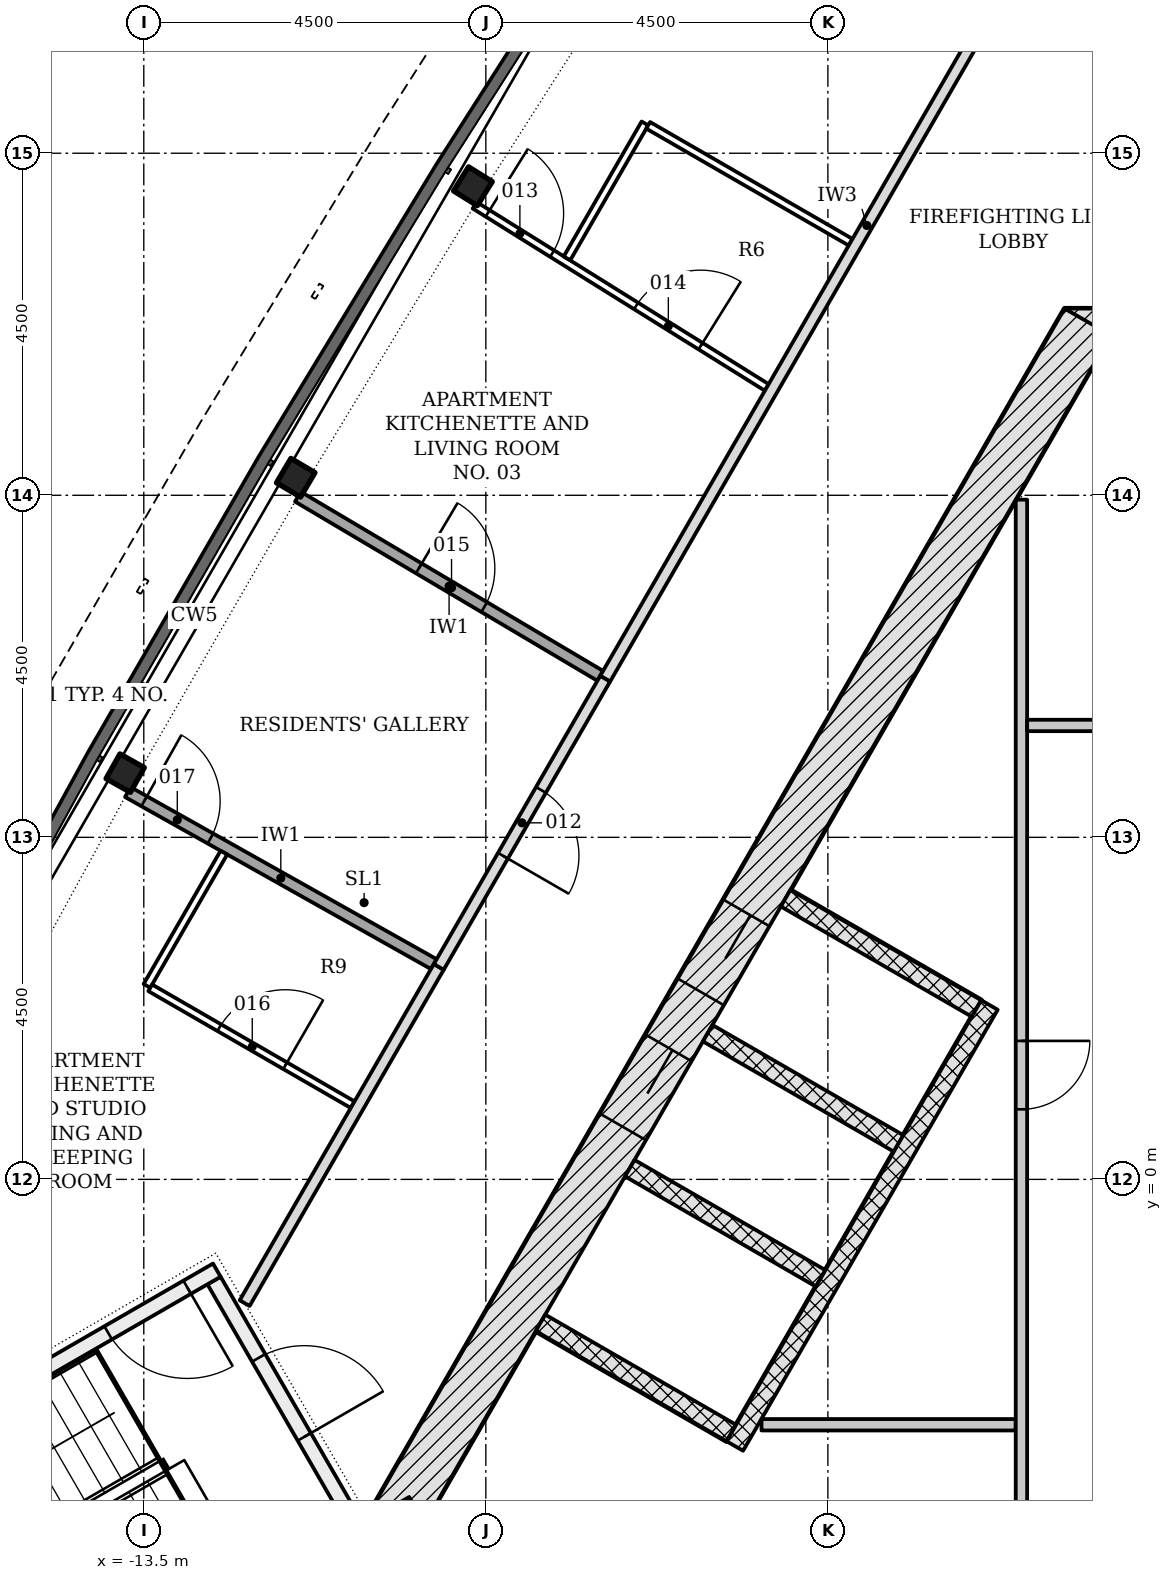
"""IFC4 building model, lengths in metres.
Left out: names, types, materials, properties, quantities, classifications, styles, units other than length and angle.
Written with IfcOpenShell. Run it as: python <this file> out.ifc"""

import sys

from ifc_helpers import new_model, si_unit, direction, frame, frame_2d, origin, origin_2d, place, context, subcontext, project, spatial, polyline, rectangle, i_section, outline, extrude, element, fill, save


model = new_model("IFC4")
c1 = context("Model", 3, precision=1e-05, world=origin(), true_north=direction((0.0, 1.0)))
c2 = subcontext(c1, "Body", "Model", "MODEL_VIEW")
j1 = project(units=[si_unit("LENGTHUNIT", "METRE"), si_unit("PLANEANGLEUNIT", "RADIAN")], contexts=[c1])
p1 = place(None, origin())
s1 = spatial("IfcSite", under=j1, at=p1, CompositionType="ELEMENT")
p2 = place(p1, origin())
s2 = spatial("IfcBuilding", under=s1, at=p2, CompositionType="ELEMENT")
p3 = place(p2, frame((0.0, 0.0, 232.8)))
s3 = spatial("IfcBuildingStorey", under=s2, at=p3, CompositionType="ELEMENT", Elevation=232.8)
p4 = place(p3, frame((1.386, 11.106, -0.2), z_axis=(0.0, 0.0, 1.0), x_axis=(-1.0, 0.0, 0.0)))
e1 = element("IfcWall", 1, at=p4, inside=s3, PredefinedType="SHEAR", context=c2, shape_type="SweptSolid", body=[
    extrude(rectangle(XDim=2.771, YDim=0.7, at=frame_2d((1.386, 0.0))), origin(), (0.0, 0.0, 1.0), 3.6),
])
p5 = place(p3, frame((-1.083, 11.281, -0.2), z_axis=(0.0, 0.0, 1.0), x_axis=(-0.500001446645, -0.866024568562, 0.0)))
e2 = element("IfcWall", 2, at=p5, inside=s3, PredefinedType="SHEAR", context=c2, shape_type="SweptSolid", body=[
    extrude(rectangle(XDim=18.458, YDim=0.7, at=frame_2d((9.229, 0.0))), origin(), (0.0, 0.0, 1.0), 3.6),
])
p6 = place(p5, frame((8.979, 0.0, 0.2)))
e3 = element("IfcOpeningElement", 3, at=p6, cuts=e2, PredefinedType="OPENING", context=c2, shape_type="SweptSolid", body=[
    extrude(rectangle(XDim=1.2, YDim=2.1, at=frame_2d((0.6, 1.05))), frame((0.0, 0.36, 0.0), z_axis=(0.0, -1.0, 0.0), x_axis=(1.0, 0.0, 0.0)), (0.0, 0.0, 1.0), 0.72),
])
p7 = place(p5, frame((11.029, 0.0, 0.2)))
e4 = element("IfcOpeningElement", 4, at=p7, cuts=e2, PredefinedType="OPENING", context=c2, shape_type="SweptSolid", body=[
    extrude(rectangle(XDim=1.2, YDim=2.1, at=frame_2d((0.6, 1.05))), frame((0.0, 0.36, 0.0), z_axis=(0.0, -1.0, 0.0), x_axis=(1.0, 0.0, 0.0)), (0.0, 0.0, 1.0), 0.72),
])
p8 = place(p3, frame((-10.311, -4.353, -0.2), z_axis=(0.0, 0.0, 1.0), x_axis=(0.500042739161, -0.866000726912, 0.0)))
e5 = element("IfcWall", 5, at=p8, inside=s3, PredefinedType="SHEAR", context=c2, shape_type="SweptSolid", body=[
    extrude(rectangle(XDim=2.771, YDim=0.7, at=frame_2d((1.386, 0.0))), origin(), (0.0, 0.0, 1.0), 3.6),
])
for number, where, z_axis, x_axis in (
    (6, (-9.17, 13.065, -0.2), (0.0, 0.0, 1.0), (-0.529, -0.849, 0.0)),
    (7, (-11.501, 9.231, -0.2), (0.0, 0.0, 1.0), (-0.51, -0.86, 0.0)),
    (8, (-13.745, 5.345, -0.2), (0.0, 0.0, 1.0), (-0.49, -0.872, 0.0)),
):
    element("IfcColumn", number, at=place(p3, frame(where, z_axis=z_axis, x_axis=x_axis)), inside=s3, PredefinedType="COLUMN", context=c2, shape_type="SweptSolid", body=[
        extrude(i_section(OverallWidth=0.373, OverallDepth=0.368, WebThickness=0.015, FlangeThickness=0.024, FilletRadius=0.015, at=origin_2d()), origin(), (0.0, 0.0, 1.0), 3.6),
    ])
p9 = place(p3, origin())
e9 = element("IfcWall", 9, at=p9, inside=s3, PredefinedType="NOTDEFINED", context=c2, shape_type="SweptSolid", body=[
    extrude(outline(polyline([(-18.457, -2.328), (-19.842, -5.13), (-20.323, -6.478), (-20.504, -7.898), (-20.375, -9.323), (-19.942, -10.687), (-19.227, -11.927), (-18.261, -12.983), (-17.092, -13.808), (-15.772, -14.361), (-14.364, -14.619), (-11.244, -14.82), (-11.225, -14.521), (-14.327, -14.32), (-15.686, -14.072), (-16.945, -13.544), (-18.062, -12.757), (-18.983, -11.748), (-19.666, -10.566), (-20.079, -9.264), (-20.202, -7.903), (-20.03, -6.548), (-19.565, -5.248), (-18.188, -2.46), (-18.457, -2.328)])), origin(), (0.0, 0.0, 1.0), 3.3),
])
for number, where, z_axis, x_axis in (
    (10, (-5.056, 3.699, -0.2), (0.0, 0.0, 1.0), (0.866, -0.5, 0.0)),
    (11, (-6.081, 1.923, -0.2), (0.0, 0.0, 1.0), (0.866, -0.5, 0.0)),
    (12, (-7.106, 0.148, -0.2), (0.0, 0.0, 1.0), (0.866, -0.5, 0.0)),
    (13, (-8.281, -1.887, -0.2), (0.0, 0.0, 1.0), (0.866, -0.5, 0.0)),
):
    element("IfcWall", number, at=place(p3, frame(where, z_axis=z_axis, x_axis=x_axis)), inside=s3, PredefinedType="PARTITIONING", context=c2, shape_type="SweptSolid", body=[
        extrude(rectangle(XDim=2.9, YDim=0.25, at=frame_2d((1.45, 0.0))), origin(), (0.0, 0.0, 1.0), 3.6),
    ])
p10 = place(p3, frame((-2.374, 2.294, 0.0), z_axis=(0.0, 0.0, 1.0), x_axis=(-0.500003174267, -0.866023571113, 0.0)))
e14 = element("IfcWall", 14, at=p10, inside=s3, PredefinedType="PARTITIONING", context=c2, shape_type="SweptSolid", body=[
    extrude(rectangle(XDim=6.7, YDim=0.25, at=frame_2d((3.35, 0.0))), origin(), (0.0, 0.0, 1.0), 3.4),
])
p11 = place(p3, frame((-5.373, -3.228, 0.0), z_axis=(0.0, 0.0, 1.0), x_axis=(1.0, 0.0, 0.0)))
e15 = element("IfcWall", 15, at=p11, inside=s3, PredefinedType="PARTITIONING", context=c2, shape_type="SweptSolid", body=[
    extrude(rectangle(XDim=3.344, YDim=0.15, at=frame_2d((1.672, 0.0))), origin(), (0.0, 0.0, 1.0), 3.4),
])
p12 = place(p3, frame((-1.954, 8.942, 0.0), z_axis=(0.0, 0.0, 1.0), x_axis=(0.0, -1.0, 0.0)))
e16 = element("IfcWall", 16, at=p12, inside=s3, PredefinedType="PARTITIONING", context=c2, shape_type="SweptSolid", body=[
    extrude(rectangle(XDim=15.171, YDim=0.15, at=frame_2d((7.585, 0.0))), origin(), (0.0, 0.0, 1.0), 3.4),
])
p13 = place(p12, frame((7.121, 0.0, 0.0)))
e17 = element("IfcOpeningElement", 17, at=p13, cuts=e16, PredefinedType="OPENING", context=c2, shape_type="SweptSolid", body=[
    extrude(rectangle(XDim=0.9, YDim=2.1, at=frame_2d((0.45, 1.05))), frame((0.0, 0.085, 0.0), z_axis=(0.0, -1.0, 0.0), x_axis=(1.0, 0.0, 0.0)), (0.0, 0.0, 1.0), 0.17),
])
p14 = place(p3, frame((-1.879, 5.972, 0.0), z_axis=(0.0, 0.0, 1.0), x_axis=(1.0, 0.0, 0.0)))
e18 = element("IfcWall", 18, at=p14, inside=s3, PredefinedType="PARTITIONING", context=c2, shape_type="SweptSolid", body=[
    extrude(rectangle(XDim=1.375, YDim=0.15, at=frame_2d((0.688, 0.0))), origin(), (0.0, 0.0, 1.0), 3.4),
])
p15 = place(p3, frame((-12.576, -1.331, -0.2), z_axis=(0.0, 0.0, 1.0), x_axis=(0.499970499736, -0.8660424351, 0.0)))
e19 = element("IfcWall", 19, at=p15, inside=s3, PredefinedType="SHEAR", context=c2, shape_type="SweptSolid", body=[
    extrude(rectangle(XDim=3.55, YDim=0.2, at=frame_2d((1.775, 0.0))), origin(), (0.0, 0.0, 1.0), 3.6),
])
p16 = place(p15, frame((1.175, 0.0, 0.2)))
e20 = element("IfcOpeningElement", 20, at=p16, cuts=e19, PredefinedType="OPENING", context=c2, shape_type="SweptSolid", body=[
    extrude(rectangle(XDim=1.2, YDim=2.1, at=frame_2d((0.6, 1.05))), frame((0.0, 0.11, 0.0), z_axis=(0.0, -1.0, 0.0), x_axis=(1.0, 0.0, 0.0)), (0.0, 0.0, 1.0), 0.22),
])
p17 = place(p3, frame((-12.539, -1.194, -0.2), z_axis=(0.0, 0.0, 1.0), x_axis=(-0.866045472092, -0.499965239061, 0.0)))
e21 = element("IfcWall", 21, at=p17, inside=s3, PredefinedType="SHEAR", context=c2, shape_type="SweptSolid", body=[
    extrude(rectangle(XDim=5.6, YDim=0.2, at=frame_2d((2.8, 0.0))), origin(), (0.0, 0.0, 1.0), 3.6),
])
p18 = place(p17, frame((0.45, 0.0, 0.2)))
e22 = element("IfcOpeningElement", 22, at=p18, cuts=e21, PredefinedType="OPENING", context=c2, shape_type="SweptSolid", body=[
    extrude(rectangle(XDim=1.2, YDim=2.1, at=frame_2d((0.6, 1.05))), frame((0.0, 0.11, 0.0), z_axis=(0.0, -1.0, 0.0), x_axis=(1.0, 0.0, 0.0)), (0.0, 0.0, 1.0), 0.22),
])
p19 = place(p3, frame((-0.545, 18.513, 0.0), z_axis=(0.0, 0.0, 1.0), x_axis=(-0.499998165157, -0.866026463129, 0.0)))
e23 = element("IfcWall", 23, at=p19, inside=s3, PredefinedType="PARTITIONING", context=c2, shape_type="SweptSolid", body=[
    extrude(rectangle(XDim=13.771, YDim=0.15, at=frame_2d((6.886, 0.0))), origin(), (0.0, 0.0, 1.0), 2.852),
])
p20 = place(p3, frame((-9.619, 2.795, 0.0), z_axis=(0.0, 0.0, 1.0), x_axis=(-0.499963809755, -0.866046297224, 0.0)))
e24 = element("IfcWall", 24, at=p20, inside=s3, PredefinedType="PARTITIONING", context=c2, shape_type="SweptSolid", body=[
    extrude(rectangle(XDim=5.108, YDim=0.15, at=frame_2d((2.554, 0.0))), origin(), (0.0, 0.0, 1.0), 2.852),
])
p21 = place(p3, frame((-11.472, 8.981, 0.0), z_axis=(0.0, 0.0, 1.0), x_axis=(0.860336137803, -0.509727113257, 0.0)))
e25 = element("IfcWall", 25, at=p21, inside=s3, PredefinedType="PARTITIONING", context=c2, shape_type="SweptSolid", body=[
    extrude(rectangle(XDim=4.623, YDim=0.15, at=frame_2d((2.312, 0.0))), origin(), (0.0, 0.0, 1.0), 3.4),
])
p22 = place(p21, frame((1.849, 0.0, 0.0)))
e26 = element("IfcOpeningElement", 26, at=p22, cuts=e25, PredefinedType="OPENING", context=c2, shape_type="SweptSolid", body=[
    extrude(rectangle(XDim=1.0, YDim=2.1, at=frame_2d((0.5, 1.05))), frame((0.0, 0.085, 0.0), z_axis=(0.0, -1.0, 0.0), x_axis=(1.0, 0.0, 0.0)), (0.0, 0.0, 1.0), 0.17),
])
p23 = place(p3, frame((-13.71, 5.096, 0.0), z_axis=(0.0, 0.0, 1.0), x_axis=(0.871644704197, -0.490138255644, 0.0)))
e27 = element("IfcWall", 27, at=p23, inside=s3, PredefinedType="PARTITIONING", context=c2, shape_type="SweptSolid", body=[
    extrude(rectangle(XDim=4.618, YDim=0.15, at=frame_2d((2.309, 0.0))), origin(), (0.0, 0.0, 1.0), 3.4),
])
p24 = place(p23, frame((0.247, 0.0, 0.0)))
e28 = element("IfcOpeningElement", 28, at=p24, cuts=e27, PredefinedType="OPENING", context=c2, shape_type="SweptSolid", body=[
    extrude(rectangle(XDim=1.0, YDim=2.1, at=frame_2d((0.5, 1.05))), frame((0.0, 0.085, 0.0), z_axis=(0.0, -1.0, 0.0), x_axis=(1.0, 0.0, 0.0)), (0.0, 0.0, 1.0), 0.17),
])
p25 = place(p3, frame((-7.43, 6.586, 0.0), z_axis=(0.0, 0.0, 1.0), x_axis=(-0.500037854553, -0.866003547345, 0.0)))
e29 = element("IfcWall", 29, at=p25, inside=s3, PredefinedType="PARTITIONING", context=c2, shape_type="SweptSolid", body=[
    extrude(rectangle(XDim=4.378, YDim=0.15, at=frame_2d((2.189, 0.0))), origin(), (0.0, 0.0, 1.0), 2.852),
])
p26 = place(p25, frame((1.689, 0.0, 0.0)))
e30 = element("IfcOpeningElement", 30, at=p26, cuts=e29, PredefinedType="OPENING", context=c2, shape_type="SweptSolid", body=[
    extrude(rectangle(XDim=1.0, YDim=2.1, at=frame_2d((0.5, 1.05))), frame((0.0, 0.085, 0.0), z_axis=(0.0, -1.0, 0.0), x_axis=(1.0, 0.0, 0.0)), (0.0, 0.0, 1.0), 0.17),
])
p27 = place(p3, frame((-9.146, 12.815, 0.0), z_axis=(0.0, 0.0, 1.0), x_axis=(0.848537029676, -0.52913600262, 0.0)))
e31 = element("IfcWall", 31, at=p27, inside=s3, PredefinedType="PARTITIONING", context=c2, shape_type="SweptSolid", body=[
    extrude(rectangle(XDim=4.528, YDim=0.1, at=frame_2d((2.264, 0.0))), origin(), (0.0, 0.0, 1.0), 3.4),
])
p28 = place(p27, frame((0.201, 0.0, 0.0)))
e32 = element("IfcOpeningElement", 32, at=p28, cuts=e31, PredefinedType="OPENING", context=c2, shape_type="SweptSolid", body=[
    extrude(rectangle(XDim=1.0, YDim=2.1, at=frame_2d((0.5, 1.05))), frame((0.0, 0.06, 0.0), z_axis=(0.0, -1.0, 0.0), x_axis=(1.0, 0.0, 0.0)), (0.0, 0.0, 1.0), 0.12),
])
p29 = place(p27, frame((2.502, 0.0, 0.0)))
e33 = element("IfcOpeningElement", 33, at=p29, cuts=e31, PredefinedType="OPENING", context=c2, shape_type="SweptSolid", body=[
    extrude(rectangle(XDim=1.0, YDim=2.1, at=frame_2d((0.5, 1.05))), frame((0.0, 0.06, 0.0), z_axis=(0.0, -1.0, 0.0), x_axis=(1.0, 0.0, 0.0)), (0.0, 0.0, 1.0), 0.12),
])
p30 = place(p3, frame((-7.932, 12.117, 0.0), z_axis=(0.0, 0.0, 1.0), x_axis=(0.499956128963, 0.866050731258, 0.0)))
e34 = element("IfcWall", 34, at=p30, inside=s3, PredefinedType="PARTITIONING", context=c2, shape_type="SweptSolid", body=[
    extrude(rectangle(XDim=2.05, YDim=0.1, at=frame_2d((1.025, 0.0))), origin(), (0.0, 0.0, 1.0), 2.852),
])
p31 = place(p3, frame((-6.864, 13.867, 0.0), z_axis=(0.0, 0.0, 1.0), x_axis=(0.866016353143, -0.500015675843, 0.0)))
e35 = element("IfcWall", 35, at=p31, inside=s3, PredefinedType="PARTITIONING", context=c2, shape_type="SweptSolid", body=[
    extrude(rectangle(XDim=3.075, YDim=0.1, at=frame_2d((1.538, 0.0))), origin(), (0.0, 0.0, 1.0), 3.4),
])
p32 = place(p3, frame((-12.446, 4.299, 0.0), z_axis=(0.0, 0.0, 1.0), x_axis=(-0.499938124251, -0.866061124818, 0.0)))
e36 = element("IfcWall", 36, at=p32, inside=s3, PredefinedType="PARTITIONING", context=c2, shape_type="SweptSolid", body=[
    extrude(rectangle(XDim=2.025, YDim=0.1, at=frame_2d((1.013, 0.0))), origin(), (0.0, 0.0, 1.0), 3.4),
])
p33 = place(p3, frame((-13.415, 2.52, 0.0), z_axis=(0.0, 0.0, 1.0), x_axis=(0.865996501658, -0.50005005661, 0.0)))
e37 = element("IfcWall", 37, at=p33, inside=s3, PredefinedType="PARTITIONING", context=c2, shape_type="SweptSolid", body=[
    extrude(rectangle(XDim=3.075, YDim=0.1, at=frame_2d((1.538, 0.0))), origin(), (0.0, 0.0, 1.0), 3.4),
])
p34 = place(p33, frame((1.05, 0.0, 0.0)))
e38 = element("IfcOpeningElement", 38, at=p34, cuts=e37, PredefinedType="OPENING", context=c2, shape_type="SweptSolid", body=[
    extrude(rectangle(XDim=1.0, YDim=2.1, at=frame_2d((0.5, 1.05))), frame((0.0, 0.06, 0.0), z_axis=(0.0, -1.0, 0.0), x_axis=(1.0, 0.0, 0.0)), (0.0, 0.0, 1.0), 0.12),
])
p35 = place(p6, origin())
e39 = element("IfcDoor", 39, at=p35, inside=s3, OperationType="DOUBLE_DOOR_SLIDING", PredefinedType="DOOR", context=c2, shape_type="SweptSolid", body=[
    extrude(rectangle(XDim=1.2, YDim=2.1, at=frame_2d((0.6, 1.05))), frame((0.0, 0.025, 0.0), z_axis=(0.0, -1.0, 0.0), x_axis=(1.0, 0.0, 0.0)), (0.0, 0.0, 1.0), 0.05),
])
fill(e3, e39)
p36 = place(p7, origin())
e40 = element("IfcDoor", 40, at=p36, inside=s3, OperationType="DOUBLE_DOOR_SLIDING", PredefinedType="DOOR", context=c2, shape_type="SweptSolid", body=[
    extrude(rectangle(XDim=1.2, YDim=2.1, at=frame_2d((0.6, 1.05))), frame((0.0, 0.025, 0.0), z_axis=(0.0, -1.0, 0.0), x_axis=(1.0, 0.0, 0.0)), (0.0, 0.0, 1.0), 0.05),
])
fill(e4, e40)
p37 = place(p13, origin())
e41 = element("IfcDoor", 41, at=p37, inside=s3, OperationType="SINGLE_SWING_LEFT", PredefinedType="DOOR", context=c2, shape_type="SweptSolid", body=[
    extrude(rectangle(XDim=0.9, YDim=2.1, at=frame_2d((0.45, 1.05))), frame((0.0, 0.025, 0.0), z_axis=(0.0, -1.0, 0.0), x_axis=(1.0, 0.0, 0.0)), (0.0, 0.0, 1.0), 0.05),
])
fill(e17, e41)
p38 = place(p16, origin())
e42 = element("IfcDoor", 42, at=p38, inside=s3, OperationType="SINGLE_SWING_RIGHT", PredefinedType="DOOR", context=c2, shape_type="SweptSolid", body=[
    extrude(rectangle(XDim=1.2, YDim=2.1, at=frame_2d((0.6, 1.05))), frame((0.0, 0.025, 0.0), z_axis=(0.0, -1.0, 0.0), x_axis=(1.0, 0.0, 0.0)), (0.0, 0.0, 1.0), 0.05),
])
fill(e20, e42)
p39 = place(p18, origin())
e43 = element("IfcDoor", 43, at=p39, inside=s3, OperationType="SINGLE_SWING_LEFT", PredefinedType="DOOR", context=c2, shape_type="SweptSolid", body=[
    extrude(rectangle(XDim=1.2, YDim=2.1, at=frame_2d((0.6, 1.05))), frame((0.0, 0.025, 0.0), z_axis=(0.0, -1.0, 0.0), x_axis=(1.0, 0.0, 0.0)), (0.0, 0.0, 1.0), 0.05),
])
fill(e22, e43)
p40 = place(p26, origin())
e44 = element("IfcDoor", 44, at=p40, inside=s3, OperationType="SINGLE_SWING_RIGHT", PredefinedType="DOOR", context=c2, shape_type="SweptSolid", body=[
    extrude(rectangle(XDim=1.0, YDim=2.1, at=frame_2d((0.5, 1.05))), frame((0.0, 0.025, 0.0), z_axis=(0.0, -1.0, 0.0), x_axis=(1.0, 0.0, 0.0)), (0.0, 0.0, 1.0), 0.05),
])
fill(e30, e44)
p41 = place(p28, origin())
e45 = element("IfcDoor", 45, at=p41, inside=s3, OperationType="SINGLE_SWING_LEFT", PredefinedType="DOOR", context=c2, shape_type="SweptSolid", body=[
    extrude(rectangle(XDim=1.0, YDim=2.1, at=frame_2d((0.5, 1.05))), frame((0.0, 0.025, 0.0), z_axis=(0.0, -1.0, 0.0), x_axis=(1.0, 0.0, 0.0)), (0.0, 0.0, 1.0), 0.05),
])
fill(e32, e45)
p42 = place(p29, origin())
e46 = element("IfcDoor", 46, at=p42, inside=s3, OperationType="SINGLE_SWING_RIGHT", PredefinedType="DOOR", context=c2, shape_type="SweptSolid", body=[
    extrude(rectangle(XDim=1.0, YDim=2.1, at=frame_2d((0.5, 1.05))), frame((0.0, 0.025, 0.0), z_axis=(0.0, -1.0, 0.0), x_axis=(1.0, 0.0, 0.0)), (0.0, 0.0, 1.0), 0.05),
])
fill(e33, e46)
p43 = place(p22, origin())
e47 = element("IfcDoor", 47, at=p43, inside=s3, OperationType="SINGLE_SWING_LEFT", PredefinedType="DOOR", context=c2, shape_type="SweptSolid", body=[
    extrude(rectangle(XDim=1.0, YDim=2.1, at=frame_2d((0.5, 1.05))), frame((0.0, 0.025, 0.0), z_axis=(0.0, -1.0, 0.0), x_axis=(1.0, 0.0, 0.0)), (0.0, 0.0, 1.0), 0.05),
])
fill(e26, e47)
p44 = place(p34, origin())
e48 = element("IfcDoor", 48, at=p44, inside=s3, OperationType="SINGLE_SWING_RIGHT", PredefinedType="DOOR", context=c2, shape_type="SweptSolid", body=[
    extrude(rectangle(XDim=1.0, YDim=2.1, at=frame_2d((0.5, 1.05))), frame((0.0, 0.025, 0.0), z_axis=(0.0, -1.0, 0.0), x_axis=(1.0, 0.0, 0.0)), (0.0, 0.0, 1.0), 0.05),
])
fill(e38, e48)
p45 = place(p24, origin())
e49 = element("IfcDoor", 49, at=p45, inside=s3, OperationType="SINGLE_SWING_LEFT", PredefinedType="DOOR", context=c2, shape_type="SweptSolid", body=[
    extrude(rectangle(XDim=1.0, YDim=2.1, at=frame_2d((0.5, 1.05))), frame((0.0, 0.025, 0.0), z_axis=(0.0, -1.0, 0.0), x_axis=(1.0, 0.0, 0.0)), (0.0, 0.0, 1.0), 0.05),
])
fill(e28, e49)
save(model, sys.argv[1])
